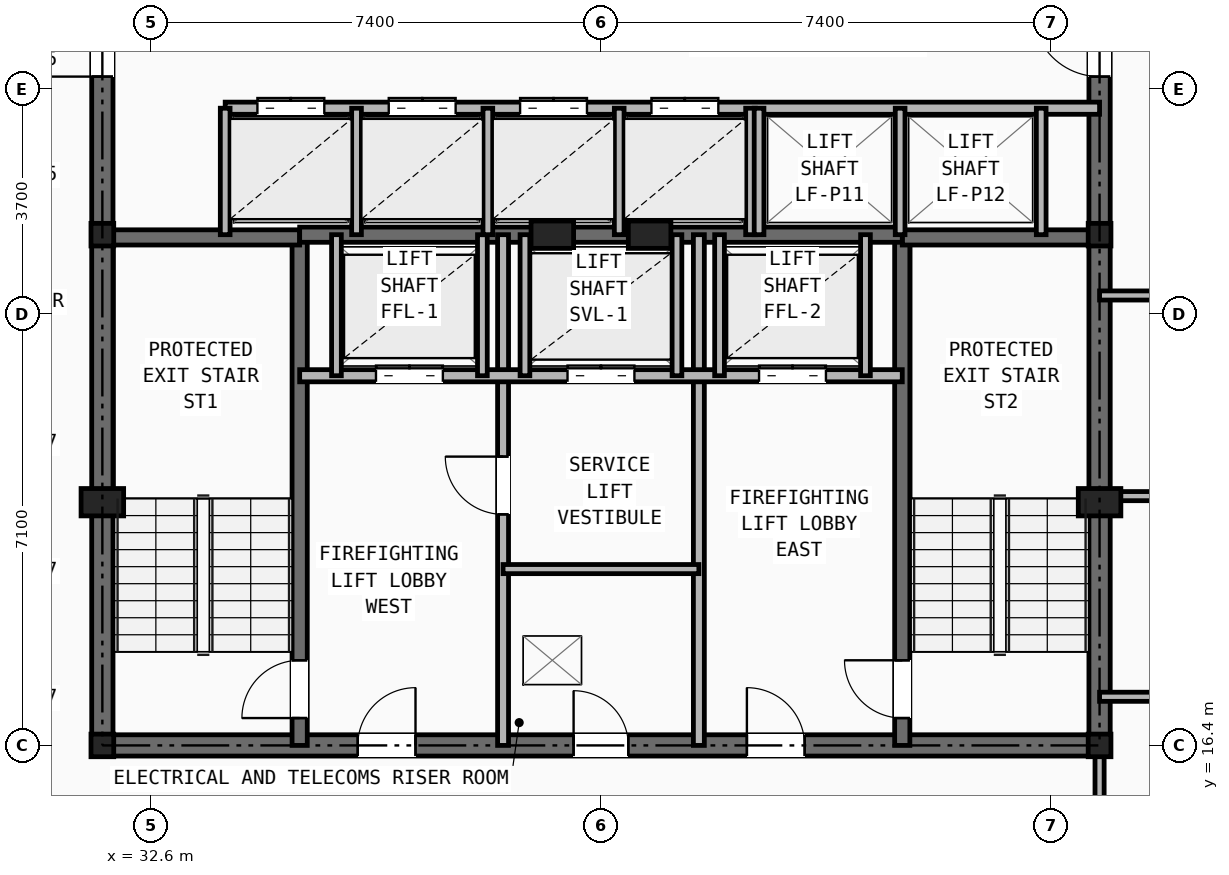
"""IFC4 building model, lengths in metres.
Left out: names, types, materials, properties, quantities, classifications, styles, units other than length and angle.
Written with IfcOpenShell. Run it as: python <this file> out.ifc"""

import sys

from ifc_helpers import new_model, si_unit, direction, frame, frame_2d, origin, origin_2d, place, context, subcontext, project, spatial, rectangle, i_section, extrude, element, fill, save


model = new_model("IFC4")
c1 = context("Model", 3, precision=1e-05, world=origin(), true_north=direction((0.0, 1.0)))
c2 = subcontext(c1, "Body", "Model", "MODEL_VIEW")
j1 = project(units=[si_unit("LENGTHUNIT", "METRE"), si_unit("PLANEANGLEUNIT", "RADIAN")], contexts=[c1])
p1 = place(None, origin())
s1 = spatial("IfcSite", under=j1, at=p1, CompositionType="ELEMENT")
p2 = place(p1, origin())
s2 = spatial("IfcBuilding", under=s1, at=p2, CompositionType="ELEMENT")
p3 = place(p2, frame((0.0, 0.0, 172.35)))
s3 = spatial("IfcBuildingStorey", under=s2, at=p3, CompositionType="ELEMENT", Elevation=172.35)
for number, where, z_axis, x_axis in (
    (1, (31.8, 16.4, 0.0), (0.0, 0.0, 1.0), (1.0, 0.0, 0.0)),
    (2, (48.2, 16.4, 0.0), (0.0, 0.0, 1.0), (1.0, 0.0, 0.0)),
    (3, (31.8, 24.8, 0.0), (0.0, 0.0, 1.0), (1.0, 0.0, 0.0)),
    (4, (48.2, 24.8, 0.0), (0.0, 0.0, 1.0), (1.0, 0.0, 0.0)),
):
    element("IfcColumn", number, at=place(p3, frame(where, z_axis=z_axis, x_axis=x_axis)), inside=s3, PredefinedType="COLUMN", context=c2, shape_type="SweptSolid", body=[
        extrude(i_section(OverallWidth=0.374, OverallDepth=0.372, WebThickness=0.016, FlangeThickness=0.026, at=origin_2d()), origin(), (0.0, 0.0, 1.0), 3.45),
    ])
for number, where, z_axis, x_axis in (
    (5, (31.8, 20.4, 0.0), (0.0, 0.0, 1.0), (1.0, 0.0, 0.0)),
    (6, (48.2, 20.4, 0.0), (0.0, 0.0, 1.0), (1.0, 0.0, 0.0)),
    (7, (39.2, 24.8, 0.0), (0.0, 0.0, 1.0), (1.0, 0.0, 0.0)),
    (8, (40.8, 24.8, 0.0), (0.0, 0.0, 1.0), (1.0, 0.0, 0.0)),
):
    element("IfcColumn", number, at=place(p3, frame(where, z_axis=z_axis, x_axis=x_axis)), inside=s3, PredefinedType="PILASTER", context=c2, shape_type="SweptSolid", body=[
        extrude(rectangle(XDim=0.7, YDim=0.45, at=origin_2d()), origin(), (0.0, 0.0, 1.0), 3.45),
    ])
p4 = place(p3, frame((31.8, 16.4, 0.0), z_axis=(0.0, 0.0, 1.0), x_axis=(1.0, 0.0, 0.0)))
e9 = element("IfcWall", 9, at=p4, inside=s3, PredefinedType="SHEAR", context=c2, shape_type="SweptSolid", body=[
    extrude(rectangle(XDim=16.4, YDim=0.35, at=frame_2d((8.2, 0.0))), origin(), (0.0, 0.0, 1.0), 3.21),
])
p5 = place(p4, frame((7.75, 0.0, 0.0)))
e10 = element("IfcOpeningElement", 10, at=p5, cuts=e9, PredefinedType="OPENING", context=c2, shape_type="SweptSolid", body=[
    extrude(rectangle(XDim=0.9, YDim=2.1, at=frame_2d((0.45, 1.05))), frame((0.0, 0.185, 0.0), z_axis=(0.0, -1.0, 0.0), x_axis=(1.0, 0.0, 0.0)), (0.0, 0.0, 1.0), 0.37),
])
p6 = place(p4, frame((4.2, 0.0, 0.0)))
e11 = element("IfcOpeningElement", 11, at=p6, cuts=e9, PredefinedType="OPENING", context=c2, shape_type="SweptSolid", body=[
    extrude(rectangle(XDim=0.95, YDim=2.1, at=frame_2d((0.475, 1.05))), frame((0.0, 0.185, 0.0), z_axis=(0.0, -1.0, 0.0), x_axis=(1.0, 0.0, 0.0)), (0.0, 0.0, 1.0), 0.37),
])
p7 = place(p4, frame((10.6, 0.0, 0.0)))
e12 = element("IfcOpeningElement", 12, at=p7, cuts=e9, PredefinedType="OPENING", context=c2, shape_type="SweptSolid", body=[
    extrude(rectangle(XDim=0.95, YDim=2.1, at=frame_2d((0.475, 1.05))), frame((0.0, 0.185, 0.0), z_axis=(0.0, -1.0, 0.0), x_axis=(1.0, 0.0, 0.0)), (0.0, 0.0, 1.0), 0.37),
])
p8 = place(p3, frame((31.8, 16.4, 0.0), z_axis=(0.0, 0.0, 1.0), x_axis=(0.0, 1.0, 0.0)))
e13 = element("IfcWall", 13, at=p8, inside=s3, PredefinedType="SHEAR", context=c2, shape_type="SweptSolid", body=[
    extrude(rectangle(XDim=14.8, YDim=0.35, at=frame_2d((7.4, 0.0))), origin(), (0.0, 0.0, 1.0), 3.21),
])
p9 = place(p8, frame((11.0, 0.0, 0.0)))
e14 = element("IfcOpeningElement", 14, at=p9, cuts=e13, PredefinedType="OPENING", context=c2, shape_type="SweptSolid", body=[
    extrude(rectangle(XDim=1.1, YDim=2.15, at=frame_2d((0.55, 1.075))), frame((0.0, 0.185, 0.0), z_axis=(0.0, -1.0, 0.0), x_axis=(1.0, 0.0, 0.0)), (0.0, 0.0, 1.0), 0.37),
])
p10 = place(p3, frame((48.2, 16.4, 0.0), z_axis=(0.0, 0.0, 1.0), x_axis=(0.0, 1.0, 0.0)))
e15 = element("IfcWall", 15, at=p10, inside=s3, PredefinedType="SHEAR", context=c2, shape_type="SweptSolid", body=[
    extrude(rectangle(XDim=14.8, YDim=0.35, at=frame_2d((7.4, 0.0))), origin(), (0.0, 0.0, 1.0), 3.21),
])
p11 = place(p10, frame((11.0, 0.0, 0.0)))
e16 = element("IfcOpeningElement", 16, at=p11, cuts=e15, PredefinedType="OPENING", context=c2, shape_type="SweptSolid", body=[
    extrude(rectangle(XDim=1.1, YDim=2.15, at=frame_2d((0.55, 1.075))), frame((0.0, 0.185, 0.0), z_axis=(0.0, -1.0, 0.0), x_axis=(1.0, 0.0, 0.0)), (0.0, 0.0, 1.0), 0.37),
])
p12 = place(p3, frame((35.045, 16.4, 0.0), z_axis=(0.0, 0.0, 1.0), x_axis=(0.0, 1.0, 0.0)))
e17 = element("IfcWall", 17, at=p12, inside=s3, PredefinedType="SHEAR", context=c2, shape_type="SweptSolid", body=[
    extrude(rectangle(XDim=8.4, YDim=0.25, at=frame_2d((4.2, 0.0))), origin(), (0.0, 0.0, 1.0), 3.21),
])
p13 = place(p12, frame((0.45, 0.0, 0.0)))
e18 = element("IfcOpeningElement", 18, at=p13, cuts=e17, PredefinedType="OPENING", context=c2, shape_type="SweptSolid", body=[
    extrude(rectangle(XDim=0.95, YDim=2.1, at=frame_2d((0.475, 1.05))), frame((0.0, 0.135, 0.0), z_axis=(0.0, -1.0, 0.0), x_axis=(1.0, 0.0, 0.0)), (0.0, 0.0, 1.0), 0.27),
])
p14 = place(p3, frame((31.8, 24.755, 0.0), z_axis=(0.0, 0.0, 1.0), x_axis=(1.0, 0.0, 0.0)))
e19 = element("IfcWall", 19, at=p14, inside=s3, PredefinedType="SHEAR", context=c2, shape_type="SweptSolid", body=[
    extrude(rectangle(XDim=3.245, YDim=0.25, at=frame_2d((1.623, 0.0))), origin(), (0.0, 0.0, 1.0), 3.21),
])
p15 = place(p3, frame((44.955, 16.4, 0.0), z_axis=(0.0, 0.0, 1.0), x_axis=(0.0, 1.0, 0.0)))
e20 = element("IfcWall", 20, at=p15, inside=s3, PredefinedType="SHEAR", context=c2, shape_type="SweptSolid", body=[
    extrude(rectangle(XDim=8.4, YDim=0.25, at=frame_2d((4.2, 0.0))), origin(), (0.0, 0.0, 1.0), 3.21),
])
p16 = place(p15, frame((0.45, 0.0, 0.0)))
e21 = element("IfcOpeningElement", 21, at=p16, cuts=e20, PredefinedType="OPENING", context=c2, shape_type="SweptSolid", body=[
    extrude(rectangle(XDim=0.95, YDim=2.1, at=frame_2d((0.475, 1.05))), frame((0.0, 0.135, 0.0), z_axis=(0.0, -1.0, 0.0), x_axis=(1.0, 0.0, 0.0)), (0.0, 0.0, 1.0), 0.27),
])
p17 = place(p3, frame((44.955, 24.755, 0.0), z_axis=(0.0, 0.0, 1.0), x_axis=(1.0, 0.0, 0.0)))
e22 = element("IfcWall", 22, at=p17, inside=s3, PredefinedType="SHEAR", context=c2, shape_type="SweptSolid", body=[
    extrude(rectangle(XDim=3.245, YDim=0.25, at=frame_2d((1.623, 0.0))), origin(), (0.0, 0.0, 1.0), 3.21),
])
p18 = place(p3, frame((35.045, 24.8, 0.0), z_axis=(0.0, 0.0, 1.0), x_axis=(1.0, 0.0, 0.0)))
e23 = element("IfcWall", 23, at=p18, inside=s3, PredefinedType="SHEAR", context=c2, shape_type="SweptSolid", body=[
    extrude(rectangle(XDim=9.91, YDim=0.25, at=frame_2d((4.955, 0.0))), origin(), (0.0, 0.0, 1.0), 3.21),
])
p19 = place(p3, frame((38.39, 16.4, 0.0), z_axis=(0.0, 0.0, 1.0), x_axis=(0.0, 1.0, 0.0)))
e24 = element("IfcWall", 24, at=p19, inside=s3, PredefinedType="PARTITIONING", context=c2, shape_type="SweptSolid", body=[
    extrude(rectangle(XDim=8.4, YDim=0.18, at=frame_2d((4.2, 0.0))), origin(), (0.0, 0.0, 1.0), 2.665),
])
p20 = place(p19, frame((3.8, 0.0, 0.0)))
e25 = element("IfcOpeningElement", 25, at=p20, cuts=e24, PredefinedType="OPENING", context=c2, shape_type="SweptSolid", body=[
    extrude(rectangle(XDim=0.95, YDim=2.1, at=frame_2d((0.475, 1.05))), frame((0.0, 0.1, 0.0), z_axis=(0.0, -1.0, 0.0), x_axis=(1.0, 0.0, 0.0)), (0.0, 0.0, 1.0), 0.2),
])
p21 = place(p3, frame((41.61, 16.4, 0.0), z_axis=(0.0, 0.0, 1.0), x_axis=(0.0, 1.0, 0.0)))
e26 = element("IfcWall", 26, at=p21, inside=s3, PredefinedType="PARTITIONING", context=c2, shape_type="SweptSolid", body=[
    extrude(rectangle(XDim=8.4, YDim=0.18, at=frame_2d((4.2, 0.0))), origin(), (0.0, 0.0, 1.0), 2.665),
])
p22 = place(p3, frame((35.045, 22.48, 0.0), z_axis=(0.0, 0.0, 1.0), x_axis=(1.0, 0.0, 0.0)))
e27 = element("IfcWall", 27, at=p22, inside=s3, PredefinedType="SOLIDWALL", context=c2, shape_type="SweptSolid", body=[
    extrude(rectangle(XDim=9.91, YDim=0.2, at=frame_2d((4.955, 0.0))), origin(), (0.0, 0.0, 1.0), 3.21),
])
p23 = place(p22, frame((1.255, 0.0, 0.0)))
e28 = element("IfcOpeningElement", 28, at=p23, cuts=e27, PredefinedType="OPENING", context=c2, shape_type="SweptSolid", body=[
    extrude(rectangle(XDim=1.1, YDim=2.15, at=frame_2d((0.55, 1.075))), frame((0.0, 0.11, 0.0), z_axis=(0.0, -1.0, 0.0), x_axis=(1.0, 0.0, 0.0)), (0.0, 0.0, 1.0), 0.22),
])
p24 = place(p22, frame((7.555, 0.0, 0.0)))
e29 = element("IfcOpeningElement", 29, at=p24, cuts=e27, PredefinedType="OPENING", context=c2, shape_type="SweptSolid", body=[
    extrude(rectangle(XDim=1.1, YDim=2.15, at=frame_2d((0.55, 1.075))), frame((0.0, 0.11, 0.0), z_axis=(0.0, -1.0, 0.0), x_axis=(1.0, 0.0, 0.0)), (0.0, 0.0, 1.0), 0.22),
])
p25 = place(p22, frame((4.405, 0.0, 0.0)))
e30 = element("IfcOpeningElement", 30, at=p25, cuts=e27, PredefinedType="OPENING", context=c2, shape_type="SweptSolid", body=[
    extrude(rectangle(XDim=1.1, YDim=2.15, at=frame_2d((0.55, 1.075))), frame((0.0, 0.11, 0.0), z_axis=(0.0, -1.0, 0.0), x_axis=(1.0, 0.0, 0.0)), (0.0, 0.0, 1.0), 0.22),
])
p26 = place(p3, frame((38.39, 19.3, 0.0), z_axis=(0.0, 0.0, 1.0), x_axis=(1.0, 0.0, 0.0)))
e31 = element("IfcWall", 31, at=p26, inside=s3, PredefinedType="PARTITIONING", context=c2, shape_type="SweptSolid", body=[
    extrude(rectangle(XDim=3.22, YDim=0.15, at=frame_2d((1.61, 0.0))), origin(), (0.0, 0.0, 1.0), 3.21),
])
for number, where, z_axis, x_axis in (
    (32, (35.65, 22.48, 0.0), (0.0, 0.0, 1.0), (0.0, 1.0, 0.0)),
    (33, (38.05, 22.48, 0.0), (0.0, 0.0, 1.0), (0.0, 1.0, 0.0)),
    (34, (41.95, 22.48, 0.0), (0.0, 0.0, 1.0), (0.0, 1.0, 0.0)),
    (35, (44.35, 22.48, 0.0), (0.0, 0.0, 1.0), (0.0, 1.0, 0.0)),
    (36, (38.75, 22.48, 0.0), (0.0, 0.0, 1.0), (0.0, 1.0, 0.0)),
    (37, (41.25, 22.48, 0.0), (0.0, 0.0, 1.0), (0.0, 1.0, 0.0)),
):
    element("IfcWall", number, at=place(p3, frame(where, z_axis=z_axis, x_axis=x_axis)), inside=s3, PredefinedType="SOLIDWALL", context=c2, shape_type="SweptSolid", body=[
        extrude(rectangle(XDim=2.32, YDim=0.16, at=frame_2d((1.16, 0.0))), origin(), (0.0, 0.0, 1.0), 3.21),
    ])
p27 = place(p3, frame((33.82, 26.88, 0.0), z_axis=(0.0, 0.0, 1.0), x_axis=(1.0, 0.0, 0.0)))
e38 = element("IfcWall", 38, at=p27, inside=s3, PredefinedType="SOLIDWALL", context=c2, shape_type="SweptSolid", body=[
    extrude(rectangle(XDim=14.38, YDim=0.2, at=frame_2d((7.19, 0.0))), origin(), (0.0, 0.0, 1.0), 2.665),
])
p28 = place(p27, frame((0.53, 0.0, 0.0)))
e39 = element("IfcOpeningElement", 39, at=p28, cuts=e38, PredefinedType="OPENING", context=c2, shape_type="SweptSolid", body=[
    extrude(rectangle(XDim=1.1, YDim=2.15, at=frame_2d((0.55, 1.075))), frame((0.0, 0.11, 0.0), z_axis=(0.0, -1.0, 0.0), x_axis=(1.0, 0.0, 0.0)), (0.0, 0.0, 1.0), 0.22),
])
p29 = place(p27, frame((2.69, 0.0, 0.0)))
e40 = element("IfcOpeningElement", 40, at=p29, cuts=e38, PredefinedType="OPENING", context=c2, shape_type="SweptSolid", body=[
    extrude(rectangle(XDim=1.1, YDim=2.15, at=frame_2d((0.55, 1.075))), frame((0.0, 0.11, 0.0), z_axis=(0.0, -1.0, 0.0), x_axis=(1.0, 0.0, 0.0)), (0.0, 0.0, 1.0), 0.22),
])
p30 = place(p27, frame((4.85, 0.0, 0.0)))
e41 = element("IfcOpeningElement", 41, at=p30, cuts=e38, PredefinedType="OPENING", context=c2, shape_type="SweptSolid", body=[
    extrude(rectangle(XDim=1.1, YDim=2.15, at=frame_2d((0.55, 1.075))), frame((0.0, 0.11, 0.0), z_axis=(0.0, -1.0, 0.0), x_axis=(1.0, 0.0, 0.0)), (0.0, 0.0, 1.0), 0.22),
])
p31 = place(p27, frame((7.01, 0.0, 0.0)))
e42 = element("IfcOpeningElement", 42, at=p31, cuts=e38, PredefinedType="OPENING", context=c2, shape_type="SweptSolid", body=[
    extrude(rectangle(XDim=1.1, YDim=2.15, at=frame_2d((0.55, 1.075))), frame((0.0, 0.11, 0.0), z_axis=(0.0, -1.0, 0.0), x_axis=(1.0, 0.0, 0.0)), (0.0, 0.0, 1.0), 0.22),
])
for number, where, z_axis, x_axis in (
    (43, (33.82, 24.8, 0.0), (0.0, 0.0, 1.0), (0.0, 1.0, 0.0)),
    (44, (35.98, 24.8, 0.0), (0.0, 0.0, 1.0), (0.0, 1.0, 0.0)),
    (45, (38.14, 24.8, 0.0), (0.0, 0.0, 1.0), (0.0, 1.0, 0.0)),
    (46, (40.3, 24.8, 0.0), (0.0, 0.0, 1.0), (0.0, 1.0, 0.0)),
    (47, (42.46, 24.8, 0.0), (0.0, 0.0, 1.0), (0.0, 1.0, 0.0)),
    (48, (42.6, 24.8, 0.0), (0.0, 0.0, 1.0), (0.0, 1.0, 0.0)),
    (49, (44.92, 24.8, 0.0), (0.0, 0.0, 1.0), (0.0, 1.0, 0.0)),
    (50, (47.24, 24.8, 0.0), (0.0, 0.0, 1.0), (0.0, 1.0, 0.0)),
):
    element("IfcWall", number, at=place(p3, frame(where, z_axis=z_axis, x_axis=x_axis)), inside=s3, PredefinedType="SOLIDWALL", context=c2, shape_type="SweptSolid", body=[
        extrude(rectangle(XDim=2.08, YDim=0.16, at=frame_2d((1.04, 0.0))), origin(), (0.0, 0.0, 1.0), 3.21),
    ])
p32 = place(p3, frame((48.2, 14.1, 0.0), z_axis=(0.0, 0.0, 1.0), x_axis=(0.0, 1.0, 0.0)))
e51 = element("IfcWall", 51, at=p32, inside=s3, PredefinedType="PARTITIONING", context=c2, shape_type="SweptSolid", body=[
    extrude(rectangle(XDim=2.3, YDim=0.15, at=frame_2d((1.15, 0.0))), origin(), (0.0, 0.0, 1.0), 2.665),
])
p33 = place(p3, frame((48.2, 17.2, 0.0), z_axis=(0.0, 0.0, 1.0), x_axis=(1.0, 0.0, 0.0)))
e52 = element("IfcWall", 52, at=p33, inside=s3, PredefinedType="PARTITIONING", context=c2, shape_type="SweptSolid", body=[
    extrude(rectangle(XDim=16.244, YDim=0.15, at=frame_2d((8.122, 0.0))), origin(), (0.0, 0.0, 1.0), 2.589),
])
p34 = place(p33, frame((1.4, 0.0, 0.0)))
e53 = element("IfcOpeningElement", 53, at=p34, cuts=e52, PredefinedType="OPENING", context=c2, shape_type="SweptSolid", body=[
    extrude(rectangle(XDim=0.95, YDim=2.1, at=frame_2d((0.475, 1.05))), frame((0.0, 0.085, 0.0), z_axis=(0.0, -1.0, 0.0), x_axis=(1.0, 0.0, 0.0)), (0.0, 0.0, 1.0), 0.17),
])
p35 = place(p3, frame((48.2, 20.5, 0.0), z_axis=(0.0, 0.0, 1.0), x_axis=(1.0, 0.0, 0.0)))
e54 = element("IfcWall", 54, at=p35, inside=s3, PredefinedType="PARTITIONING", context=c2, shape_type="SweptSolid", body=[
    extrude(rectangle(XDim=14.171, YDim=0.15, at=frame_2d((7.085, 0.0))), origin(), (0.0, 0.0, 1.0), 2.589),
])
p36 = place(p35, frame((1.4, 0.0, 0.0)))
e55 = element("IfcOpeningElement", 55, at=p36, cuts=e54, PredefinedType="OPENING", context=c2, shape_type="SweptSolid", body=[
    extrude(rectangle(XDim=0.95, YDim=2.1, at=frame_2d((0.475, 1.05))), frame((0.0, 0.085, 0.0), z_axis=(0.0, -1.0, 0.0), x_axis=(1.0, 0.0, 0.0)), (0.0, 0.0, 1.0), 0.17),
])
p37 = place(p3, frame((48.2, 23.8, 0.0), z_axis=(0.0, 0.0, 1.0), x_axis=(1.0, 0.0, 0.0)))
e56 = element("IfcWall", 56, at=p37, inside=s3, PredefinedType="PARTITIONING", context=c2, shape_type="SweptSolid", body=[
    extrude(rectangle(XDim=12.097, YDim=0.15, at=frame_2d((6.049, 0.0))), origin(), (0.0, 0.0, 1.0), 2.589),
])
p38 = place(p37, frame((1.4, 0.0, 0.0)))
e57 = element("IfcOpeningElement", 57, at=p38, cuts=e56, PredefinedType="OPENING", context=c2, shape_type="SweptSolid", body=[
    extrude(rectangle(XDim=0.95, YDim=2.1, at=frame_2d((0.475, 1.05))), frame((0.0, 0.085, 0.0), z_axis=(0.0, -1.0, 0.0), x_axis=(1.0, 0.0, 0.0)), (0.0, 0.0, 1.0), 0.17),
])
p39 = place(p5, origin())
e58 = element("IfcDoor", 58, at=p39, inside=s3, OperationType="SINGLE_SWING_LEFT", PredefinedType="DOOR", context=c2, shape_type="SweptSolid", body=[
    extrude(rectangle(XDim=0.9, YDim=2.1, at=frame_2d((0.45, 1.05))), frame((0.0, 0.025, 0.0), z_axis=(0.0, -1.0, 0.0), x_axis=(1.0, 0.0, 0.0)), (0.0, 0.0, 1.0), 0.05),
])
fill(e10, e58)
p40 = place(p20, origin())
e59 = element("IfcDoor", 59, at=p40, inside=s3, OperationType="SINGLE_SWING_RIGHT", PredefinedType="DOOR", context=c2, shape_type="SweptSolid", body=[
    extrude(rectangle(XDim=0.95, YDim=2.1, at=frame_2d((0.475, 1.05))), frame((0.0, 0.025, 0.0), z_axis=(0.0, -1.0, 0.0), x_axis=(1.0, 0.0, 0.0)), (0.0, 0.0, 1.0), 0.05),
])
fill(e25, e59)
p41 = place(p13, origin())
e60 = element("IfcDoor", 60, at=p41, inside=s3, OperationType="SINGLE_SWING_LEFT", PredefinedType="DOOR", context=c2, shape_type="SweptSolid", body=[
    extrude(rectangle(XDim=0.95, YDim=2.1, at=frame_2d((0.475, 1.05))), frame((0.0, 0.025, 0.0), z_axis=(0.0, -1.0, 0.0), x_axis=(1.0, 0.0, 0.0)), (0.0, 0.0, 1.0), 0.05),
])
fill(e18, e60)
p42 = place(p16, origin())
e61 = element("IfcDoor", 61, at=p42, inside=s3, OperationType="SINGLE_SWING_RIGHT", PredefinedType="DOOR", context=c2, shape_type="SweptSolid", body=[
    extrude(rectangle(XDim=0.95, YDim=2.1, at=frame_2d((0.475, 1.05))), frame((0.0, 0.025, 0.0), z_axis=(0.0, -1.0, 0.0), x_axis=(1.0, 0.0, 0.0)), (0.0, 0.0, 1.0), 0.05),
])
fill(e21, e61)
p43 = place(p6, origin())
e62 = element("IfcDoor", 62, at=p43, inside=s3, OperationType="SINGLE_SWING_RIGHT", PredefinedType="DOOR", context=c2, shape_type="SweptSolid", body=[
    extrude(rectangle(XDim=0.95, YDim=2.1, at=frame_2d((0.475, 1.05))), frame((0.0, 0.025, 0.0), z_axis=(0.0, -1.0, 0.0), x_axis=(1.0, 0.0, 0.0)), (0.0, 0.0, 1.0), 0.05),
])
fill(e11, e62)
p44 = place(p7, origin())
e63 = element("IfcDoor", 63, at=p44, inside=s3, OperationType="SINGLE_SWING_LEFT", PredefinedType="DOOR", context=c2, shape_type="SweptSolid", body=[
    extrude(rectangle(XDim=0.95, YDim=2.1, at=frame_2d((0.475, 1.05))), frame((0.0, 0.025, 0.0), z_axis=(0.0, -1.0, 0.0), x_axis=(1.0, 0.0, 0.0)), (0.0, 0.0, 1.0), 0.05),
])
fill(e12, e63)
p45 = place(p23, origin())
e64 = element("IfcDoor", 64, at=p45, inside=s3, OperationType="DOUBLE_DOOR_SLIDING", PredefinedType="DOOR", context=c2, shape_type="SweptSolid", body=[
    extrude(rectangle(XDim=1.1, YDim=2.15, at=frame_2d((0.55, 1.075))), frame((0.0, 0.025, 0.0), z_axis=(0.0, -1.0, 0.0), x_axis=(1.0, 0.0, 0.0)), (0.0, 0.0, 1.0), 0.05),
])
fill(e28, e64)
p46 = place(p24, origin())
e65 = element("IfcDoor", 65, at=p46, inside=s3, OperationType="DOUBLE_DOOR_SLIDING", PredefinedType="DOOR", context=c2, shape_type="SweptSolid", body=[
    extrude(rectangle(XDim=1.1, YDim=2.15, at=frame_2d((0.55, 1.075))), frame((0.0, 0.025, 0.0), z_axis=(0.0, -1.0, 0.0), x_axis=(1.0, 0.0, 0.0)), (0.0, 0.0, 1.0), 0.05),
])
fill(e29, e65)
p47 = place(p25, origin())
e66 = element("IfcDoor", 66, at=p47, inside=s3, OperationType="DOUBLE_DOOR_SLIDING", PredefinedType="DOOR", context=c2, shape_type="SweptSolid", body=[
    extrude(rectangle(XDim=1.1, YDim=2.15, at=frame_2d((0.55, 1.075))), frame((0.0, 0.025, 0.0), z_axis=(0.0, -1.0, 0.0), x_axis=(1.0, 0.0, 0.0)), (0.0, 0.0, 1.0), 0.05),
])
fill(e30, e66)
p48 = place(p9, origin())
e67 = element("IfcDoor", 67, at=p48, inside=s3, OperationType="SINGLE_SWING_LEFT", PredefinedType="DOOR", context=c2, shape_type="SweptSolid", body=[
    extrude(rectangle(XDim=1.1, YDim=2.15, at=frame_2d((0.55, 1.075))), frame((0.0, 0.025, 0.0), z_axis=(0.0, -1.0, 0.0), x_axis=(1.0, 0.0, 0.0)), (0.0, 0.0, 1.0), 0.05),
])
fill(e14, e67)
p49 = place(p11, origin())
e68 = element("IfcDoor", 68, at=p49, inside=s3, OperationType="SINGLE_SWING_RIGHT", PredefinedType="DOOR", context=c2, shape_type="SweptSolid", body=[
    extrude(rectangle(XDim=1.1, YDim=2.15, at=frame_2d((0.55, 1.075))), frame((0.0, 0.025, 0.0), z_axis=(0.0, -1.0, 0.0), x_axis=(1.0, 0.0, 0.0)), (0.0, 0.0, 1.0), 0.05),
])
fill(e16, e68)
p50 = place(p28, origin())
e69 = element("IfcDoor", 69, at=p50, inside=s3, OperationType="DOUBLE_DOOR_SLIDING", PredefinedType="DOOR", context=c2, shape_type="SweptSolid", body=[
    extrude(rectangle(XDim=1.1, YDim=2.15, at=frame_2d((0.55, 1.075))), frame((0.0, 0.025, 0.0), z_axis=(0.0, -1.0, 0.0), x_axis=(1.0, 0.0, 0.0)), (0.0, 0.0, 1.0), 0.05),
])
fill(e39, e69)
p51 = place(p29, origin())
e70 = element("IfcDoor", 70, at=p51, inside=s3, OperationType="DOUBLE_DOOR_SLIDING", PredefinedType="DOOR", context=c2, shape_type="SweptSolid", body=[
    extrude(rectangle(XDim=1.1, YDim=2.15, at=frame_2d((0.55, 1.075))), frame((0.0, 0.025, 0.0), z_axis=(0.0, -1.0, 0.0), x_axis=(1.0, 0.0, 0.0)), (0.0, 0.0, 1.0), 0.05),
])
fill(e40, e70)
p52 = place(p30, origin())
e71 = element("IfcDoor", 71, at=p52, inside=s3, OperationType="DOUBLE_DOOR_SLIDING", PredefinedType="DOOR", context=c2, shape_type="SweptSolid", body=[
    extrude(rectangle(XDim=1.1, YDim=2.15, at=frame_2d((0.55, 1.075))), frame((0.0, 0.025, 0.0), z_axis=(0.0, -1.0, 0.0), x_axis=(1.0, 0.0, 0.0)), (0.0, 0.0, 1.0), 0.05),
])
fill(e41, e71)
p53 = place(p31, origin())
e72 = element("IfcDoor", 72, at=p53, inside=s3, OperationType="DOUBLE_DOOR_SLIDING", PredefinedType="DOOR", context=c2, shape_type="SweptSolid", body=[
    extrude(rectangle(XDim=1.1, YDim=2.15, at=frame_2d((0.55, 1.075))), frame((0.0, 0.025, 0.0), z_axis=(0.0, -1.0, 0.0), x_axis=(1.0, 0.0, 0.0)), (0.0, 0.0, 1.0), 0.05),
])
fill(e42, e72)
save(model, sys.argv[1])
